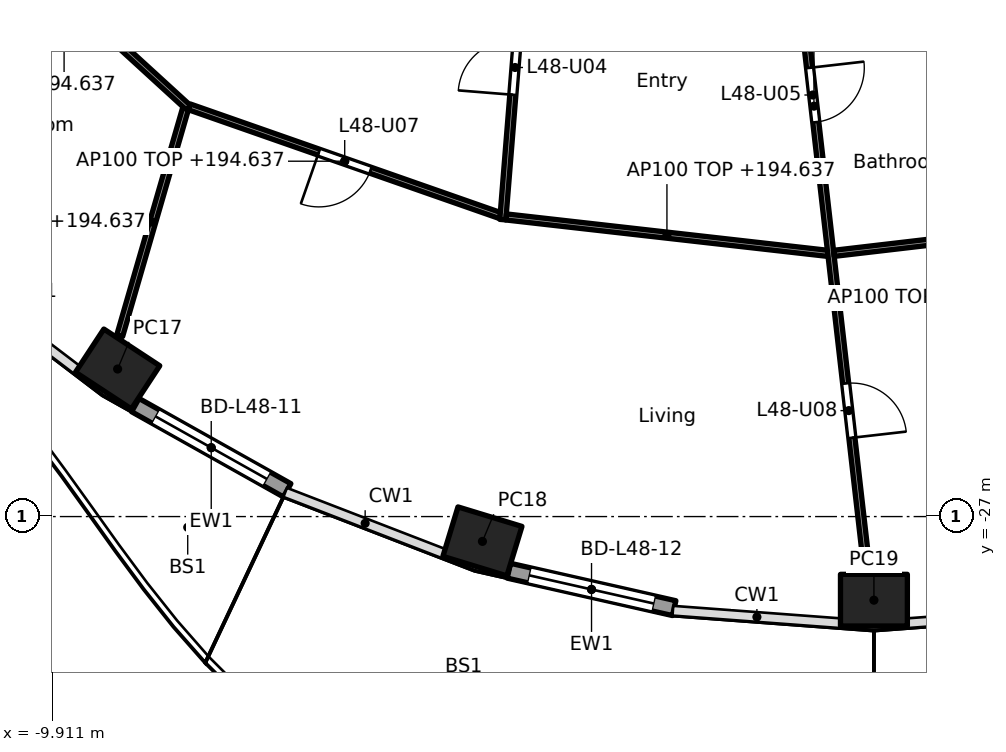
"""IFC4 building model, lengths in metres.
Left out: names, types, materials, properties, quantities, classifications, styles, units other than length and angle.
Written with IfcOpenShell. Run it as: python <this file> out.ifc"""

import sys

from ifc_helpers import new_model, si_unit, direction, frame, frame_2d, origin, origin_2d, place, context, subcontext, project, spatial, rectangle, hollow_rectangle, extrude, element, fill, save


model = new_model("IFC4")
c1 = context("Model", 3, precision=1e-05, world=origin(), true_north=direction((0.0, 1.0)))
c2 = subcontext(c1, "Body", "Model", "MODEL_VIEW")
j1 = project(units=[si_unit("LENGTHUNIT", "METRE"), si_unit("PLANEANGLEUNIT", "RADIAN")], contexts=[c1])
p1 = place(None, origin())
s1 = spatial("IfcSite", under=j1, at=p1, CompositionType="ELEMENT")
p2 = place(p1, origin())
s2 = spatial("IfcBuilding", under=s1, at=p2, CompositionType="ELEMENT")
p3 = place(p2, frame((0.0, 0.0, 191.8)))
s3 = spatial("IfcBuildingStorey", under=s2, at=p3, CompositionType="ELEMENT", Elevation=191.8)
for number, where, z_axis, x_axis in (
    (1, (-8.837, -24.573, 0.0), (0.0, 0.0, 1.0), (0.836, -0.549, 0.0)),
    (2, (-2.838, -27.408, 0.0), (0.0, 0.0, 1.0), (0.957, -0.292, 0.0)),
    (3, (3.6, -28.375, 0.0), (0.0, 0.0, 1.0), (1.0, 0.0, 0.0)),
):
    element("IfcColumn", number, at=place(p3, frame(where, z_axis=z_axis, x_axis=x_axis)), inside=s3, PredefinedType="COLUMN", context=c2, shape_type="SweptSolid", body=[
        extrude(hollow_rectangle(XDim=1.1, YDim=0.85, WallThickness=0.036, at=origin_2d()), origin(), (0.0, 0.0, 1.0), 3.7),
    ])
p4 = place(p3, frame((-6.049, -26.568, 0.0), z_axis=(0.0, 0.0, 1.0), x_axis=(-0.872078262455, 0.489366431371, 0.0)))
e4 = element("IfcWall", 4, at=p4, inside=s3, PredefinedType="SOLIDWALL", context=c2, shape_type="SweptSolid", body=[
    extrude(rectangle(XDim=2.864, YDim=0.25, at=frame_2d((1.432, 0.0))), origin(), (0.0, 0.0, 1.0), 3.44),
])
p5 = place(p4, frame((0.382, 0.0, 0.0)))
e5 = element("IfcOpeningElement", 5, at=p5, cuts=e4, PredefinedType="OPENING", context=c2, shape_type="SweptSolid", body=[
    extrude(rectangle(XDim=2.1, YDim=2.4, at=frame_2d((1.05, 1.2))), frame((0.0, 0.135, 0.0), z_axis=(0.0, -1.0, 0.0), x_axis=(1.0, 0.0, 0.0)), (0.0, 0.0, 1.0), 0.27),
])
p6 = place(p3, frame((0.315, -28.506, 0.0), z_axis=(0.0, 0.0, 1.0), x_axis=(-0.975324329911, 0.220776926974, 0.0)))
e6 = element("IfcWall", 6, at=p6, inside=s3, PredefinedType="SOLIDWALL", context=c2, shape_type="SweptSolid", body=[
    extrude(rectangle(XDim=2.788, YDim=0.25, at=frame_2d((1.394, 0.0))), origin(), (0.0, 0.0, 1.0), 3.44),
])
p7 = place(p6, frame((0.344, 0.0, 0.0)))
e7 = element("IfcOpeningElement", 7, at=p7, cuts=e6, PredefinedType="OPENING", context=c2, shape_type="SweptSolid", body=[
    extrude(rectangle(XDim=2.1, YDim=2.4, at=frame_2d((1.05, 1.2))), frame((0.0, 0.135, 0.0), z_axis=(0.0, -1.0, 0.0), x_axis=(1.0, 0.0, 0.0)), (0.0, 0.0, 1.0), 0.27),
])
p8 = place(p3, frame((-7.712, -10.195, 0.0), z_axis=(0.0, 0.0, 1.0), x_axis=(-0.544176533609, -0.838970738625, 0.0)))
e8 = element("IfcWall", 8, at=p8, inside=s3, PredefinedType="PARTITIONING", context=c2, shape_type="SweptSolid", body=[
    extrude(rectangle(XDim=11.156, YDim=0.1, at=frame_2d((5.578, 0.0))), origin(), (0.0, 0.0, 1.0), 2.756),
])
p9 = place(p8, frame((5.101, 0.0, 0.0)))
e9 = element("IfcOpeningElement", 9, at=p9, cuts=e8, PredefinedType="OPENING", context=c2, shape_type="SweptSolid", body=[
    extrude(rectangle(XDim=0.9, YDim=2.1, at=frame_2d((0.45, 1.05))), frame((0.0, 0.06, 0.0), z_axis=(0.0, -1.0, 0.0), x_axis=(1.0, 0.0, 0.0)), (0.0, 0.0, 1.0), 0.12),
])
p10 = place(p3, frame((-11.766, -16.535, 0.0), z_axis=(0.0, 0.0, 1.0), x_axis=(0.738053852169, -0.674741810842, 0.0)))
e10 = element("IfcWall", 10, at=p10, inside=s3, PredefinedType="PARTITIONING", context=c2, shape_type="SweptSolid", body=[
    extrude(rectangle(XDim=5.549, YDim=0.1, at=frame_2d((2.774, 0.0))), origin(), (0.0, 0.0, 1.0), 2.837),
])
p11 = place(p10, frame((2.3, 0.0, 0.0)))
e11 = element("IfcOpeningElement", 11, at=p11, cuts=e10, PredefinedType="OPENING", context=c2, shape_type="SweptSolid", body=[
    extrude(rectangle(XDim=0.9, YDim=2.1, at=frame_2d((0.45, 1.05))), frame((0.0, 0.06, 0.0), z_axis=(0.0, -1.0, 0.0), x_axis=(1.0, 0.0, 0.0)), (0.0, 0.0, 1.0), 0.12),
])
p12 = place(p3, frame((-7.721, -20.293, 0.0), z_axis=(0.0, 0.0, 1.0), x_axis=(-0.278445616281, -0.960451997121, 0.0)))
e12 = element("IfcWall", 12, at=p12, inside=s3, PredefinedType="PARTITIONING", context=c2, shape_type="SweptSolid", body=[
    extrude(rectangle(XDim=3.885, YDim=0.1, at=frame_2d((1.942, 0.0))), origin(), (0.0, 0.0, 1.0), 2.837),
])
p13 = place(p3, frame((-7.66, -20.262, 0.0), z_axis=(0.0, 0.0, 1.0), x_axis=(0.943911038661, -0.330199865375, 0.0)))
e13 = element("IfcWall", 13, at=p13, inside=s3, PredefinedType="PARTITIONING", context=c2, shape_type="SweptSolid", body=[
    extrude(rectangle(XDim=5.417, YDim=0.1, at=frame_2d((2.709, 0.0))), origin(), (0.0, 0.0, 1.0), 2.837),
])
p14 = place(p13, frame((2.259, 0.0, 0.0)))
e14 = element("IfcOpeningElement", 14, at=p14, cuts=e13, PredefinedType="OPENING", context=c2, shape_type="SweptSolid", body=[
    extrude(rectangle(XDim=0.9, YDim=2.1, at=frame_2d((0.45, 1.05))), frame((0.0, 0.06, 0.0), z_axis=(0.0, -1.0, 0.0), x_axis=(1.0, 0.0, 0.0)), (0.0, 0.0, 1.0), 0.12),
])
p15 = place(p3, frame((-1.743, -12.665, 0.0), z_axis=(0.0, 0.0, 1.0), x_axis=(-0.080170892619, -0.996781133437, 0.0)))
e15 = element("IfcWall", 15, at=p15, inside=s3, PredefinedType="PARTITIONING", context=c2, shape_type="SweptSolid", body=[
    extrude(rectangle(XDim=9.483, YDim=0.1, at=frame_2d((4.741, 0.0))), origin(), (0.0, 0.0, 1.0), 2.756),
])
p16 = place(p15, frame((1.806, 0.0, 0.0)))
e16 = element("IfcOpeningElement", 16, at=p16, cuts=e15, PredefinedType="OPENING", context=c2, shape_type="SweptSolid", body=[
    extrude(rectangle(XDim=0.9, YDim=2.1, at=frame_2d((0.45, 1.05))), frame((0.0, 0.06, 0.0), z_axis=(0.0, -1.0, 0.0), x_axis=(1.0, 0.0, 0.0)), (0.0, 0.0, 1.0), 0.12),
])
p17 = place(p15, frame((6.523, 0.0, 0.0)))
e17 = element("IfcOpeningElement", 17, at=p17, cuts=e15, PredefinedType="OPENING", context=c2, shape_type="SweptSolid", body=[
    extrude(rectangle(XDim=0.9, YDim=2.1, at=frame_2d((0.45, 1.05))), frame((0.0, 0.06, 0.0), z_axis=(0.0, -1.0, 0.0), x_axis=(1.0, 0.0, 0.0)), (0.0, 0.0, 1.0), 0.12),
])
p18 = place(p3, frame((-2.449, -22.073, 0.0), z_axis=(0.0, 0.0, 1.0), x_axis=(0.993660315081, -0.112424099879, 0.0)))
e18 = element("IfcWall", 18, at=p18, inside=s3, PredefinedType="PARTITIONING", context=c2, shape_type="SweptSolid", body=[
    extrude(rectangle(XDim=5.325, YDim=0.1, at=frame_2d((2.662, 0.0))), origin(), (0.0, 0.0, 1.0), 2.837),
])
p19 = place(p3, frame((1.746, -12.664, 0.0), z_axis=(0.0, 0.0, 1.0), x_axis=(0.113624134758, -0.993523807465, 0.0)))
e19 = element("IfcWall", 19, at=p19, inside=s3, PredefinedType="PARTITIONING", context=c2, shape_type="SweptSolid", body=[
    extrude(rectangle(XDim=15.273, YDim=0.1, at=frame_2d((7.636, 0.0))), origin(), (0.0, 0.0, 1.0), 2.756),
])
p20 = place(p19, frame((1.962, 0.0, 0.0)))
e20 = element("IfcOpeningElement", 20, at=p20, cuts=e19, PredefinedType="OPENING", context=c2, shape_type="SweptSolid", body=[
    extrude(rectangle(XDim=0.9, YDim=2.1, at=frame_2d((0.45, 1.05))), frame((0.0, 0.06, 0.0), z_axis=(0.0, -1.0, 0.0), x_axis=(1.0, 0.0, 0.0)), (0.0, 0.0, 1.0), 0.12),
])
p21 = place(p19, frame((7.002, 0.0, 0.0)))
e21 = element("IfcOpeningElement", 21, at=p21, cuts=e19, PredefinedType="OPENING", context=c2, shape_type="SweptSolid", body=[
    extrude(rectangle(XDim=0.9, YDim=2.1, at=frame_2d((0.45, 1.05))), frame((0.0, 0.06, 0.0), z_axis=(0.0, -1.0, 0.0), x_axis=(1.0, 0.0, 0.0)), (0.0, 0.0, 1.0), 0.12),
])
p22 = place(p19, frame((12.226, 0.0, 0.0)))
e22 = element("IfcOpeningElement", 22, at=p22, cuts=e19, PredefinedType="OPENING", context=c2, shape_type="SweptSolid", body=[
    extrude(rectangle(XDim=0.9, YDim=2.1, at=frame_2d((0.45, 1.05))), frame((0.0, 0.06, 0.0), z_axis=(0.0, -1.0, 0.0), x_axis=(1.0, 0.0, 0.0)), (0.0, 0.0, 1.0), 0.12),
])
p23 = place(p3, frame((2.941, -22.671, 0.0), z_axis=(0.0, 0.0, 1.0), x_axis=(0.993247307754, 0.116016316261, 0.0)))
e23 = element("IfcWall", 23, at=p23, inside=s3, PredefinedType="PARTITIONING", context=c2, shape_type="SweptSolid", body=[
    extrude(rectangle(XDim=5.358, YDim=0.1, at=frame_2d((2.679, 0.0))), origin(), (0.0, 0.0, 1.0), 2.837),
])
p24 = place(p23, frame((3.581, 0.0, 0.0)))
e24 = element("IfcOpeningElement", 24, at=p24, cuts=e23, PredefinedType="OPENING", context=c2, shape_type="SweptSolid", body=[
    extrude(rectangle(XDim=0.9, YDim=2.1, at=frame_2d((0.45, 1.05))), frame((0.0, 0.06, 0.0), z_axis=(0.0, -1.0, 0.0), x_axis=(1.0, 0.0, 0.0)), (0.0, 0.0, 1.0), 0.12),
])
p25 = place(p5, origin())
e25 = element("IfcDoor", 25, at=p25, inside=s3, OperationType="SLIDING_TO_LEFT", PredefinedType="DOOR", context=c2, shape_type="SweptSolid", body=[
    extrude(rectangle(XDim=2.1, YDim=2.4, at=frame_2d((1.05, 1.2))), frame((0.0, 0.025, 0.0), z_axis=(0.0, -1.0, 0.0), x_axis=(1.0, 0.0, 0.0)), (0.0, 0.0, 1.0), 0.05),
])
fill(e5, e25)
p26 = place(p7, origin())
e26 = element("IfcDoor", 26, at=p26, inside=s3, OperationType="SLIDING_TO_LEFT", PredefinedType="DOOR", context=c2, shape_type="SweptSolid", body=[
    extrude(rectangle(XDim=2.1, YDim=2.4, at=frame_2d((1.05, 1.2))), frame((0.0, 0.025, 0.0), z_axis=(0.0, -1.0, 0.0), x_axis=(1.0, 0.0, 0.0)), (0.0, 0.0, 1.0), 0.05),
])
fill(e7, e26)
p27 = place(p17, frame((0.9, 0.0, 0.0), x_axis=(-1.0, 0.0, 0.0)))
e27 = element("IfcDoor", 27, at=p27, inside=s3, OperationType="SINGLE_SWING_LEFT", PredefinedType="DOOR", context=c2, shape_type="SweptSolid", body=[
    extrude(rectangle(XDim=0.9, YDim=2.1, at=frame_2d((0.45, 1.05))), frame((0.0, 0.025, 0.0), z_axis=(0.0, -1.0, 0.0), x_axis=(1.0, 0.0, 0.0)), (0.0, 0.0, 1.0), 0.05),
])
fill(e17, e27)
p28 = place(p21, origin())
e28 = element("IfcDoor", 28, at=p28, inside=s3, OperationType="SINGLE_SWING_LEFT", PredefinedType="DOOR", context=c2, shape_type="SweptSolid", body=[
    extrude(rectangle(XDim=0.9, YDim=2.1, at=frame_2d((0.45, 1.05))), frame((0.0, 0.025, 0.0), z_axis=(0.0, -1.0, 0.0), x_axis=(1.0, 0.0, 0.0)), (0.0, 0.0, 1.0), 0.05),
])
fill(e21, e28)
p29 = place(p14, frame((0.9, 0.0, 0.0), x_axis=(-1.0, 0.0, 0.0)))
e29 = element("IfcDoor", 29, at=p29, inside=s3, OperationType="SINGLE_SWING_RIGHT", PredefinedType="DOOR", context=c2, shape_type="SweptSolid", body=[
    extrude(rectangle(XDim=0.9, YDim=2.1, at=frame_2d((0.45, 1.05))), frame((0.0, 0.025, 0.0), z_axis=(0.0, -1.0, 0.0), x_axis=(1.0, 0.0, 0.0)), (0.0, 0.0, 1.0), 0.05),
])
fill(e14, e29)
p30 = place(p22, origin())
e30 = element("IfcDoor", 30, at=p30, inside=s3, OperationType="SINGLE_SWING_RIGHT", PredefinedType="DOOR", context=c2, shape_type="SweptSolid", body=[
    extrude(rectangle(XDim=0.9, YDim=2.1, at=frame_2d((0.45, 1.05))), frame((0.0, 0.025, 0.0), z_axis=(0.0, -1.0, 0.0), x_axis=(1.0, 0.0, 0.0)), (0.0, 0.0, 1.0), 0.05),
])
fill(e22, e30)
save(model, sys.argv[1])
